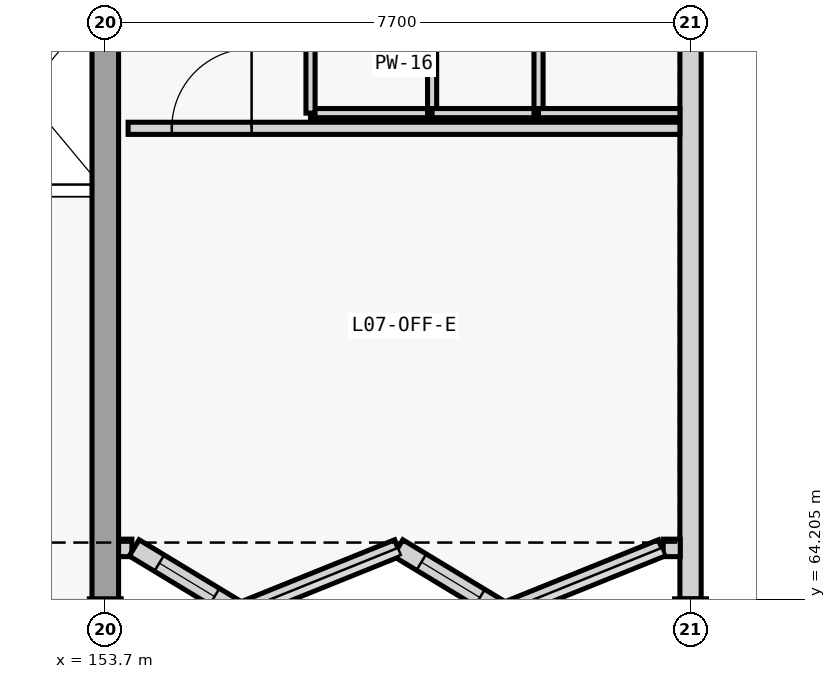
"""IFC4 building model, lengths in metres.
Left out: names, types, materials, properties, quantities, classifications, styles, units other than length and angle.
Written with IfcOpenShell. Run it as: python <this file> out.ifc"""

import sys

from ifc_helpers import new_model, si_unit, direction, frame, frame_2d, origin, origin_2d, place, context, subcontext, project, spatial, rectangle, extrude, element, fill, save


model = new_model("IFC4")
c1 = context("Model", 3, precision=1e-05, world=origin(), true_north=direction((0.0, 1.0)))
c2 = subcontext(c1, "Body", "Model", "MODEL_VIEW")
j1 = project(units=[si_unit("LENGTHUNIT", "METRE"), si_unit("PLANEANGLEUNIT", "RADIAN")], contexts=[c1])
p1 = place(None, origin())
s1 = spatial("IfcSite", under=j1, at=p1, CompositionType="ELEMENT")
p2 = place(p1, origin())
s2 = spatial("IfcBuilding", under=s1, at=p2, CompositionType="ELEMENT")
p3 = place(p2, frame((0.0, 0.0, 28.8)))
s3 = spatial("IfcBuildingStorey", under=s2, at=p3, CompositionType="ELEMENT", Elevation=28.8)
for number, where, z_axis, x_axis in (
    (1, (153.7, 64.0, 0.0), (0.0, 0.0, 1.0), (1.0, 0.0, 0.0)),
    (2, (161.4, 64.0, 0.0), (0.0, 0.0, 1.0), (1.0, 0.0, 0.0)),
):
    element("IfcColumn", number, at=place(p3, frame(where, z_axis=z_axis, x_axis=x_axis)), inside=s3, PredefinedType="COLUMN", context=c2, shape_type="SweptSolid", body=[
        extrude(rectangle(XDim=0.42, YDim=0.42, at=origin_2d()), origin(), (0.0, 0.0, 1.0), 3.6),
    ])
p4 = place(p3, frame((161.4, 96.792, 0.0), z_axis=(0.0, 0.0, 1.0), x_axis=(0.0, -1.0, 0.0)))
e3 = element("IfcWall", 3, at=p4, inside=s3, PredefinedType="SOLIDWALL", context=c2, shape_type="SweptSolid", body=[
    extrude(rectangle(XDim=32.584, YDim=0.28, at=frame_2d((16.292, 0.0))), origin(), (0.0, 0.0, 1.0), 2.78),
])
p5 = place(p4, frame((17.492, 0.0, 0.82)))
e4 = element("IfcOpeningElement", 4, at=p5, cuts=e3, PredefinedType="OPENING", context=c2, shape_type="SweptSolid", body=[
    extrude(rectangle(XDim=4.8, YDim=1.55, at=frame_2d((2.4, 0.775))), frame((0.0, 0.15, 0.0), z_axis=(0.0, -1.0, 0.0), x_axis=(1.0, 0.0, 0.0)), (0.0, 0.0, 1.0), 0.3),
])
p6 = place(p3, frame((154.05, 64.88, 0.0), z_axis=(0.0, 0.0, 1.0), x_axis=(-1.0, 0.0, 0.0)))
e5 = element("IfcWall", 5, at=p6, inside=s3, PredefinedType="SOLIDWALL", context=c2, shape_type="SweptSolid", body=[
    extrude(rectangle(XDim=0.18, YDim=0.23, at=frame_2d((0.09, 0.0))), origin(), (0.0, 0.0, 1.0), 3.36),
])
p7 = place(p3, frame((161.265, 64.88, 0.0), z_axis=(0.0, 0.0, 1.0), x_axis=(-1.0, 0.0, 0.0)))
e6 = element("IfcWall", 6, at=p7, inside=s3, PredefinedType="SOLIDWALL", context=c2, shape_type="SweptSolid", body=[
    extrude(rectangle(XDim=0.225, YDim=0.23, at=frame_2d((0.112, 0.0))), origin(), (0.0, 0.0, 1.0), 3.36),
])
p8 = place(p3, frame((155.468, 64.04, 0.0), z_axis=(0.0, 0.0, 1.0), x_axis=(-0.855561475997, 0.51770122734, 0.0)))
e7 = element("IfcWall", 7, at=p8, inside=s3, PredefinedType="SOLIDWALL", context=c2, shape_type="SweptSolid", body=[
    extrude(rectangle(XDim=1.622, YDim=0.25, at=frame_2d((0.811, 0.0))), origin(), (0.0, 0.0, 1.0), 3.36),
])
p9 = place(p8, frame((0.386, 0.0, 0.82)))
e8 = element("IfcOpeningElement", 8, at=p9, cuts=e7, PredefinedType="OPENING", context=c2, shape_type="SweptSolid", body=[
    extrude(rectangle(XDim=0.85, YDim=1.4, at=frame_2d((0.425, 0.7))), frame((0.0, 0.135, 0.0), z_axis=(0.0, -1.0, 0.0), x_axis=(1.0, 0.0, 0.0)), (0.0, 0.0, 1.0), 0.27),
])
p10 = place(p3, frame((157.55, 64.88, 0.0), z_axis=(0.0, 0.0, 1.0), x_axis=(-0.927392797001, -0.374089026933, 0.0)))
e9 = element("IfcWall", 9, at=p10, inside=s3, PredefinedType="SOLIDWALL", context=c2, shape_type="SweptSolid", body=[
    extrude(rectangle(XDim=2.245, YDim=0.23, at=frame_2d((1.123, 0.0))), origin(), (0.0, 0.0, 1.0), 3.36),
])
p11 = place(p3, frame((158.938, 64.04, 0.0), z_axis=(0.0, 0.0, 1.0), x_axis=(-0.855561475997, 0.51770122734, 0.0)))
e10 = element("IfcWall", 10, at=p11, inside=s3, PredefinedType="SOLIDWALL", context=c2, shape_type="SweptSolid", body=[
    extrude(rectangle(XDim=1.622, YDim=0.25, at=frame_2d((0.811, 0.0))), origin(), (0.0, 0.0, 1.0), 3.36),
])
p12 = place(p11, frame((0.361, 0.0, 0.82)))
e11 = element("IfcOpeningElement", 11, at=p12, cuts=e10, PredefinedType="OPENING", context=c2, shape_type="SweptSolid", body=[
    extrude(rectangle(XDim=0.9, YDim=1.45, at=frame_2d((0.45, 0.725))), frame((0.0, 0.135, 0.0), z_axis=(0.0, -1.0, 0.0), x_axis=(1.0, 0.0, 0.0)), (0.0, 0.0, 1.0), 0.27),
])
p13 = place(p3, frame((161.02, 64.88, 0.0), z_axis=(0.0, 0.0, 1.0), x_axis=(-0.927392797001, -0.374089026933, 0.0)))
e12 = element("IfcWall", 12, at=p13, inside=s3, PredefinedType="SOLIDWALL", context=c2, shape_type="SweptSolid", body=[
    extrude(rectangle(XDim=2.245, YDim=0.23, at=frame_2d((1.123, 0.0))), origin(), (0.0, 0.0, 1.0), 3.36),
])
p14 = place(p3, frame((153.7, 64.0, 0.0), z_axis=(0.0, 0.0, 1.0), x_axis=(0.0, 1.0, 0.0)))
e13 = element("IfcWall", 13, at=p14, inside=s3, PredefinedType="SHEAR", context=c2, shape_type="SweptSolid", body=[
    extrude(rectangle(XDim=8.4, YDim=0.35, at=frame_2d((4.2, 0.0))), origin(), (0.0, 0.0, 1.0), 3.6),
])
p15 = place(p3, frame((156.4, 70.6, 0.0), z_axis=(0.0, 0.0, 1.0), x_axis=(1.0, 0.0, 0.0)))
e14 = element("IfcWall", 14, at=p15, inside=s3, PredefinedType="PARTITIONING", context=c2, shape_type="SweptSolid", body=[
    extrude(rectangle(XDim=1.6, YDim=0.12, at=frame_2d((0.8, 0.0))), origin(), (0.0, 0.0, 1.0), 3.34),
])
p16 = place(p3, frame((156.4, 70.6, 0.0), z_axis=(0.0, 0.0, 1.0), x_axis=(0.0, 1.0, 0.0)))
e15 = element("IfcWall", 15, at=p16, inside=s3, PredefinedType="PARTITIONING", context=c2, shape_type="SweptSolid", body=[
    extrude(rectangle(XDim=5.2, YDim=0.12, at=frame_2d((2.6, 0.0))), origin(), (0.0, 0.0, 1.0), 3.34),
])
p17 = place(p16, frame((2.16, 0.0, 0.0)))
e16 = element("IfcOpeningElement", 16, at=p17, cuts=e15, PredefinedType="OPENING", context=c2, shape_type="SweptSolid", body=[
    extrude(rectangle(XDim=0.88, YDim=2.1, at=frame_2d((0.44, 1.05))), frame((0.0, 0.07, 0.0), z_axis=(0.0, -1.0, 0.0), x_axis=(1.0, 0.0, 0.0)), (0.0, 0.0, 1.0), 0.14),
])
p18 = place(p3, frame((158.0, 70.6, 0.0), z_axis=(0.0, 0.0, 1.0), x_axis=(0.0, 1.0, 0.0)))
e17 = element("IfcWall", 17, at=p18, inside=s3, PredefinedType="PARTITIONING", context=c2, shape_type="SweptSolid", body=[
    extrude(rectangle(XDim=5.2, YDim=0.12, at=frame_2d((2.6, 0.0))), origin(), (0.0, 0.0, 1.0), 3.34),
])
p19 = place(p3, frame((158.0, 70.6, 0.0), z_axis=(0.0, 0.0, 1.0), x_axis=(1.0, 0.0, 0.0)))
e18 = element("IfcWall", 18, at=p19, inside=s3, PredefinedType="PARTITIONING", context=c2, shape_type="SweptSolid", body=[
    extrude(rectangle(XDim=1.4, YDim=0.12, at=frame_2d((0.7, 0.0))), origin(), (0.0, 0.0, 1.0), 3.34),
])
p20 = place(p3, frame((159.4, 70.6, 0.0), z_axis=(0.0, 0.0, 1.0), x_axis=(0.0, 1.0, 0.0)))
e19 = element("IfcWall", 19, at=p20, inside=s3, PredefinedType="PARTITIONING", context=c2, shape_type="SweptSolid", body=[
    extrude(rectangle(XDim=5.2, YDim=0.12, at=frame_2d((2.6, 0.0))), origin(), (0.0, 0.0, 1.0), 3.34),
])
p21 = place(p3, frame((159.4, 70.6, 0.0), z_axis=(0.0, 0.0, 1.0), x_axis=(1.0, 0.0, 0.0)))
e20 = element("IfcWall", 20, at=p21, inside=s3, PredefinedType="PARTITIONING", context=c2, shape_type="SweptSolid", body=[
    extrude(rectangle(XDim=1.86, YDim=0.12, at=frame_2d((0.93, 0.0))), origin(), (0.0, 0.0, 1.0), 3.34),
])
p22 = place(p3, frame((154.0, 70.4, 0.0), z_axis=(0.0, 0.0, 1.0), x_axis=(1.0, 0.0, 0.0)))
e21 = element("IfcWall", 21, at=p22, inside=s3, PredefinedType="PARTITIONING", context=c2, shape_type="SweptSolid", body=[
    extrude(rectangle(XDim=7.26, YDim=0.16, at=frame_2d((3.63, 0.0))), origin(), (0.0, 0.0, 1.0), 3.34),
])
p23 = place(p22, frame((0.575, 0.0, 0.0)))
e22 = element("IfcOpeningElement", 22, at=p23, cuts=e21, PredefinedType="OPENING", context=c2, shape_type="SweptSolid", body=[
    extrude(rectangle(XDim=1.05, YDim=2.15, at=frame_2d((0.525, 1.075))), frame((0.0, 0.09, 0.0), z_axis=(0.0, -1.0, 0.0), x_axis=(1.0, 0.0, 0.0)), (0.0, 0.0, 1.0), 0.18),
])
p24 = place(p9, origin())
e23 = element("IfcWindow", 23, at=p24, inside=s3, PartitioningType="SINGLE_PANEL", PredefinedType="WINDOW", context=c2, shape_type="SweptSolid", body=[
    extrude(rectangle(XDim=0.85, YDim=1.4, at=frame_2d((0.425, 0.7))), frame((0.0, 0.03, 0.0), z_axis=(0.0, -1.0, 0.0), x_axis=(1.0, 0.0, 0.0)), (0.0, 0.0, 1.0), 0.06),
])
fill(e8, e23)
p25 = place(p12, origin())
e24 = element("IfcWindow", 24, at=p25, inside=s3, PartitioningType="SINGLE_PANEL", PredefinedType="WINDOW", context=c2, shape_type="SweptSolid", body=[
    extrude(rectangle(XDim=0.9, YDim=1.45, at=frame_2d((0.45, 0.725))), frame((0.0, 0.03, 0.0), z_axis=(0.0, -1.0, 0.0), x_axis=(1.0, 0.0, 0.0)), (0.0, 0.0, 1.0), 0.06),
])
fill(e11, e24)
p26 = place(p23, origin())
e25 = element("IfcDoor", 25, at=p26, inside=s3, OperationType="SINGLE_SWING_RIGHT", PredefinedType="DOOR", context=c2, shape_type="SweptSolid", body=[
    extrude(rectangle(XDim=1.05, YDim=2.15, at=frame_2d((0.525, 1.075))), frame((0.0, 0.025, 0.0), z_axis=(0.0, -1.0, 0.0), x_axis=(1.0, 0.0, 0.0)), (0.0, 0.0, 1.0), 0.05),
])
fill(e22, e25)
save(model, sys.argv[1])
